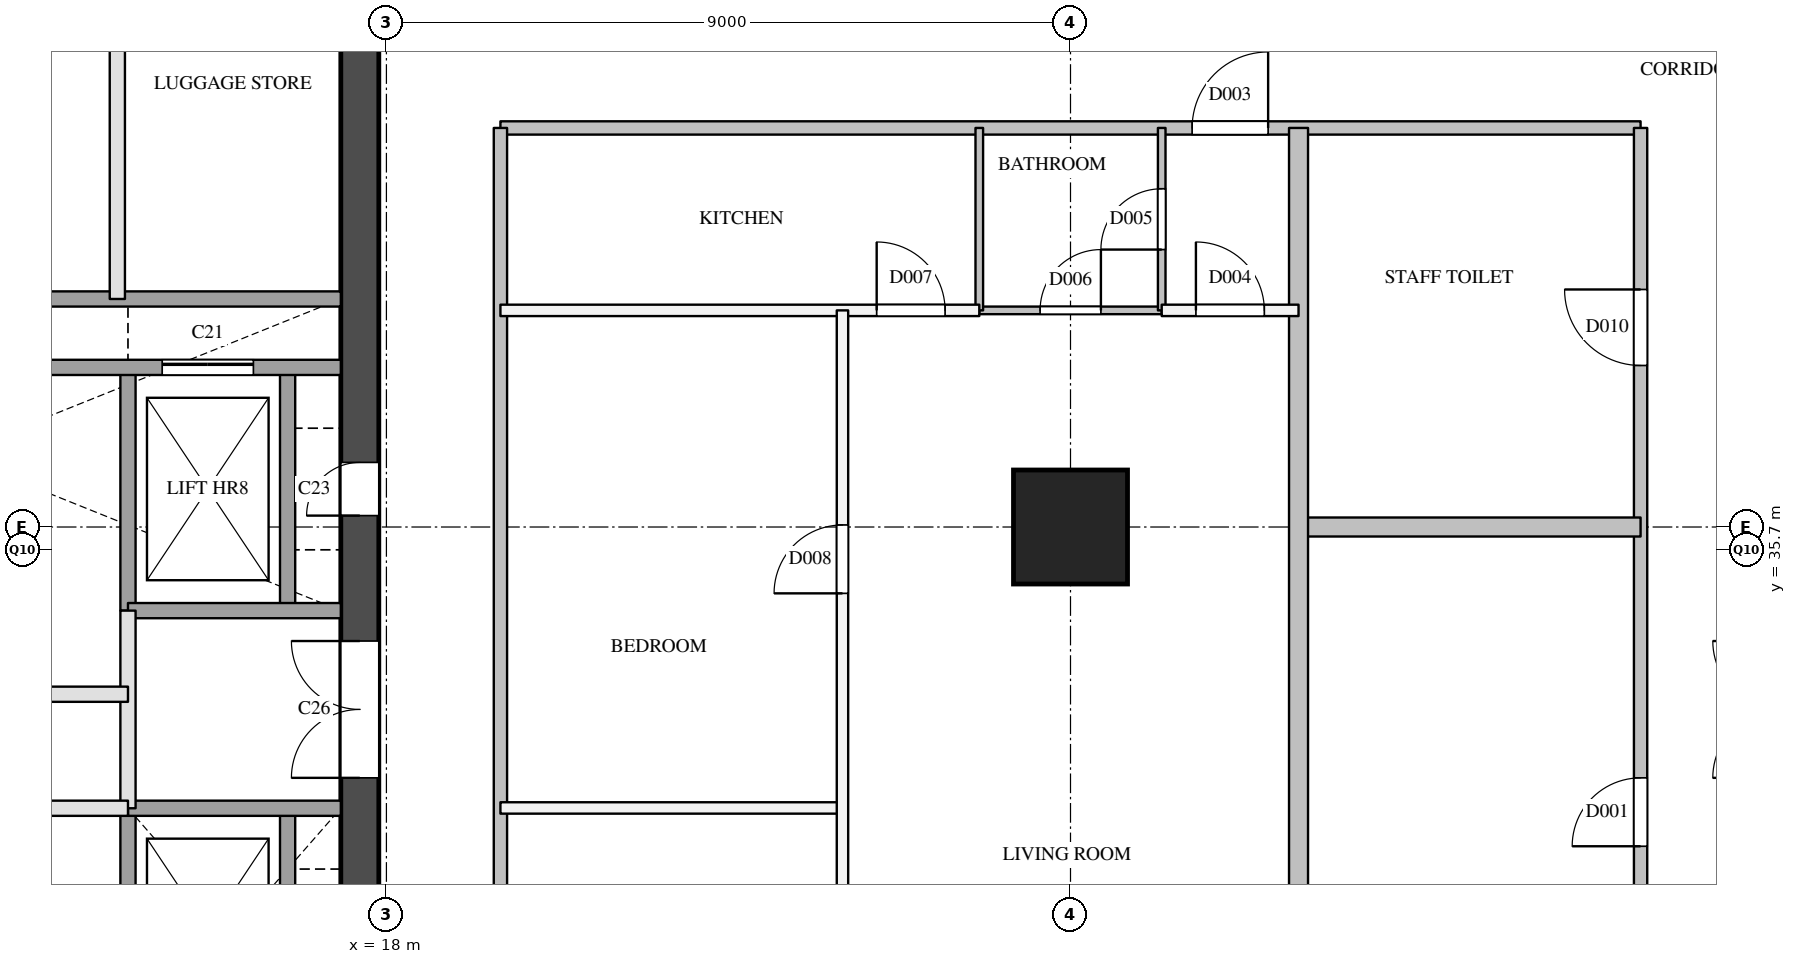
"""IFC4 building model, lengths in metres.
Left out: names, types, materials, properties, quantities, classifications, styles, units other than length and angle.
Written with IfcOpenShell. Run it as: python <this file> out.ifc"""

import sys

from ifc_helpers import new_model, si_unit, direction, frame, frame_2d, origin, origin_2d, place, context, subcontext, project, spatial, rectangle, extrude, element, fill, save


model = new_model("IFC4")
c1 = context("Model", 3, precision=1e-05, world=origin(), true_north=direction((0.0, 1.0)))
c2 = subcontext(c1, "Body", "Model", "MODEL_VIEW")
j1 = project(units=[si_unit("LENGTHUNIT", "METRE"), si_unit("PLANEANGLEUNIT", "RADIAN")], contexts=[c1])
p1 = place(None, origin())
s1 = spatial("IfcSite", under=j1, at=p1, CompositionType="ELEMENT")
p2 = place(p1, origin())
s2 = spatial("IfcBuilding", under=s1, at=p2, CompositionType="ELEMENT")
p3 = place(p2, frame((0.0, 0.0, 150.5)))
s3 = spatial("IfcBuildingStorey", under=s2, at=p3, CompositionType="ELEMENT", Elevation=150.5)
p4 = place(p3, frame((27.0, 36.0, 0.0), z_axis=(0.0, 0.0, 1.0), x_axis=(1.0, 0.0, 0.0)))
e1 = element("IfcColumn", 1, at=p4, inside=s3, PredefinedType="COLUMN", context=c2, shape_type="SweptSolid", body=[
    extrude(rectangle(XDim=1.5, YDim=1.5, at=origin_2d()), origin(), (0.0, 0.0, 1.0), 3.9),
])
p5 = place(p3, frame((17.65, 29.1, 0.0), z_axis=(0.0, 0.0, 1.0), x_axis=(0.0, 1.0, 0.0)))
e2 = element("IfcWall", 2, at=p5, inside=s3, PredefinedType="SHEAR", context=c2, shape_type="SweptSolid", body=[
    extrude(rectangle(XDim=20.3, YDim=0.5, at=frame_2d((10.15, 0.0))), origin(), (0.0, 0.0, 1.0), 3.6),
])
p6 = place(p5, frame((1.25, 0.0, 0.0)))
e3 = element("IfcOpeningElement", 3, at=p6, cuts=e2, PredefinedType="OPENING", context=c2, shape_type="SweptSolid", body=[
    extrude(rectangle(XDim=0.7, YDim=2.1, at=frame_2d((0.35, 1.05))), frame((0.0, 0.26, 0.0), z_axis=(0.0, -1.0, 0.0), x_axis=(1.0, 0.0, 0.0)), (0.0, 0.0, 1.0), 0.52),
])
p7 = place(p5, frame((7.05, 0.0, 0.0)))
e4 = element("IfcOpeningElement", 4, at=p7, cuts=e2, PredefinedType="OPENING", context=c2, shape_type="SweptSolid", body=[
    extrude(rectangle(XDim=0.7, YDim=2.1, at=frame_2d((0.35, 1.05))), frame((0.0, 0.26, 0.0), z_axis=(0.0, -1.0, 0.0), x_axis=(1.0, 0.0, 0.0)), (0.0, 0.0, 1.0), 0.52),
])
p8 = place(p5, frame((3.6, 0.0, 0.0)))
e5 = element("IfcOpeningElement", 5, at=p8, cuts=e2, PredefinedType="OPENING", context=c2, shape_type="SweptSolid", body=[
    extrude(rectangle(XDim=1.8, YDim=2.1, at=frame_2d((0.9, 1.05))), frame((0.0, 0.26, 0.0), z_axis=(0.0, -1.0, 0.0), x_axis=(1.0, 0.0, 0.0)), (0.0, 0.0, 1.0), 0.52),
])
p9 = place(p3, frame((14.46, 39.0, 0.0), z_axis=(0.0, 0.0, 1.0), x_axis=(0.0, 1.0, 0.0)))
e6 = element("IfcWall", 6, at=p9, inside=s3, PredefinedType="PARTITIONING", context=c2, shape_type="SweptSolid", body=[
    extrude(rectangle(XDim=6.2, YDim=0.2, at=frame_2d((3.1, 0.0))), origin(), (0.0, 0.0, 1.0), 3.6),
])
p10 = place(p3, frame((14.6, 32.3, 0.0), z_axis=(0.0, 0.0, 1.0), x_axis=(0.0, 1.0, 0.0)))
e7 = element("IfcWall", 7, at=p10, inside=s3, PredefinedType="PARTITIONING", context=c2, shape_type="SweptSolid", body=[
    extrude(rectangle(XDim=2.6, YDim=0.2, at=frame_2d((1.3, 0.0))), origin(), (0.0, 0.0, 1.0), 3.6),
])
p11 = place(p3, frame((14.6, 29.1, 0.0), z_axis=(0.0, 0.0, 1.0), x_axis=(0.0, 1.0, 0.0)))
e8 = element("IfcWall", 8, at=p11, inside=s3, PredefinedType="SOLIDWALL", context=c2, shape_type="SweptSolid", body=[
    extrude(rectangle(XDim=3.2, YDim=0.2, at=frame_2d((1.6, 0.0))), origin(), (0.0, 0.0, 1.0), 3.6),
])
p12 = place(p3, frame((14.6, 34.9, 0.0), z_axis=(0.0, 0.0, 1.0), x_axis=(0.0, 1.0, 0.0)))
e9 = element("IfcWall", 9, at=p12, inside=s3, PredefinedType="SOLIDWALL", context=c2, shape_type="SweptSolid", body=[
    extrude(rectangle(XDim=3.2, YDim=0.2, at=frame_2d((1.6, 0.0))), origin(), (0.0, 0.0, 1.0), 3.6),
])
p13 = place(p3, frame((16.7, 29.1, 0.0), z_axis=(0.0, 0.0, 1.0), x_axis=(0.0, 1.0, 0.0)))
e10 = element("IfcWall", 10, at=p13, inside=s3, PredefinedType="SOLIDWALL", context=c2, shape_type="SweptSolid", body=[
    extrude(rectangle(XDim=3.2, YDim=0.2, at=frame_2d((1.6, 0.0))), origin(), (0.0, 0.0, 1.0), 3.6),
])
p14 = place(p3, frame((16.7, 34.9, 0.0), z_axis=(0.0, 0.0, 1.0), x_axis=(0.0, 1.0, 0.0)))
e11 = element("IfcWall", 11, at=p14, inside=s3, PredefinedType="SOLIDWALL", context=c2, shape_type="SweptSolid", body=[
    extrude(rectangle(XDim=3.2, YDim=0.2, at=frame_2d((1.6, 0.0))), origin(), (0.0, 0.0, 1.0), 3.6),
])
p15 = place(p3, frame((6.2, 32.3, 0.0), z_axis=(0.0, 0.0, 1.0), x_axis=(1.0, 0.0, 0.0)))
e12 = element("IfcWall", 12, at=p15, inside=s3, PredefinedType="PARTITIONING", context=c2, shape_type="SweptSolid", body=[
    extrude(rectangle(XDim=8.4, YDim=0.2, at=frame_2d((4.2, 0.0))), origin(), (0.0, 0.0, 1.0), 3.6),
])
p16 = place(p15, frame((2.07, 0.0, 0.0)))
e13 = element("IfcOpeningElement", 13, at=p16, cuts=e12, PredefinedType="OPENING", context=c2, shape_type="SweptSolid", body=[
    extrude(rectangle(XDim=0.9, YDim=2.1, at=frame_2d((0.45, 1.05))), frame((0.0, 0.11, 0.0), z_axis=(0.0, -1.0, 0.0), x_axis=(1.0, 0.0, 0.0)), (0.0, 0.0, 1.0), 0.22),
])
p17 = place(p15, frame((6.27, 0.0, 0.0)))
e14 = element("IfcOpeningElement", 14, at=p17, cuts=e12, PredefinedType="OPENING", context=c2, shape_type="SweptSolid", body=[
    extrude(rectangle(XDim=0.9, YDim=2.1, at=frame_2d((0.45, 1.05))), frame((0.0, 0.11, 0.0), z_axis=(0.0, -1.0, 0.0), x_axis=(1.0, 0.0, 0.0)), (0.0, 0.0, 1.0), 0.22),
])
p18 = place(p3, frame((14.6, 32.3, 0.0), z_axis=(0.0, 0.0, 1.0), x_axis=(1.0, 0.0, 0.0)))
e15 = element("IfcWall", 15, at=p18, inside=s3, PredefinedType="SOLIDWALL", context=c2, shape_type="SweptSolid", body=[
    extrude(rectangle(XDim=2.8, YDim=0.2, at=frame_2d((1.4, 0.0))), origin(), (0.0, 0.0, 1.0), 3.6),
])
p19 = place(p3, frame((6.2, 33.8, 0.0), z_axis=(0.0, 0.0, 1.0), x_axis=(1.0, 0.0, 0.0)))
e16 = element("IfcWall", 16, at=p19, inside=s3, PredefinedType="PARTITIONING", context=c2, shape_type="SweptSolid", body=[
    extrude(rectangle(XDim=8.4, YDim=0.2, at=frame_2d((4.2, 0.0))), origin(), (0.0, 0.0, 1.0), 3.6),
])
p20 = place(p19, frame((0.81, 0.0, 0.0)))
e17 = element("IfcOpeningElement", 17, at=p20, cuts=e16, PredefinedType="OPENING", context=c2, shape_type="SweptSolid", body=[
    extrude(rectangle(XDim=0.9, YDim=2.1, at=frame_2d((0.45, 1.05))), frame((0.0, 0.11, 0.0), z_axis=(0.0, -1.0, 0.0), x_axis=(1.0, 0.0, 0.0)), (0.0, 0.0, 1.0), 0.22),
])
p21 = place(p19, frame((5.01, 0.0, 0.0)))
e18 = element("IfcOpeningElement", 18, at=p21, cuts=e16, PredefinedType="OPENING", context=c2, shape_type="SweptSolid", body=[
    extrude(rectangle(XDim=0.9, YDim=2.1, at=frame_2d((0.45, 1.05))), frame((0.0, 0.11, 0.0), z_axis=(0.0, -1.0, 0.0), x_axis=(1.0, 0.0, 0.0)), (0.0, 0.0, 1.0), 0.22),
])
p22 = place(p3, frame((14.6, 34.9, 0.0), z_axis=(0.0, 0.0, 1.0), x_axis=(1.0, 0.0, 0.0)))
e19 = element("IfcWall", 19, at=p22, inside=s3, PredefinedType="SOLIDWALL", context=c2, shape_type="SweptSolid", body=[
    extrude(rectangle(XDim=2.8, YDim=0.2, at=frame_2d((1.4, 0.0))), origin(), (0.0, 0.0, 1.0), 3.6),
])
p23 = place(p3, frame((6.2, 38.1, 0.0), z_axis=(0.0, 0.0, 1.0), x_axis=(1.0, 0.0, 0.0)))
e20 = element("IfcWall", 20, at=p23, inside=s3, PredefinedType="SOLIDWALL", context=c2, shape_type="SweptSolid", body=[
    extrude(rectangle(XDim=11.2, YDim=0.2, at=frame_2d((5.6, 0.0))), origin(), (0.0, 0.0, 1.0), 3.6),
])
p24 = place(p23, frame((8.85, 0.0, 0.0)))
e21 = element("IfcOpeningElement", 21, at=p24, cuts=e20, PredefinedType="OPENING", context=c2, shape_type="SweptSolid", body=[
    extrude(rectangle(XDim=1.2, YDim=2.1, at=frame_2d((0.6, 1.05))), frame((0.0, 0.11, 0.0), z_axis=(0.0, -1.0, 0.0), x_axis=(1.0, 0.0, 0.0)), (0.0, 0.0, 1.0), 0.22),
])
p25 = place(p3, frame((12.5, 39.0, 0.0), z_axis=(0.0, 0.0, 1.0), x_axis=(1.0, 0.0, 0.0)))
e22 = element("IfcWall", 22, at=p25, inside=s3, PredefinedType="SOLIDWALL", context=c2, shape_type="SweptSolid", body=[
    extrude(rectangle(XDim=4.9, YDim=0.2, at=frame_2d((2.45, 0.0))), origin(), (0.0, 0.0, 1.0), 3.6),
])
p26 = place(p3, frame((19.5, 41.25, 0.0), z_axis=(0.0, 0.0, 1.0), x_axis=(1.0, 0.0, 0.0)))
e23 = element("IfcWall", 23, at=p26, inside=s3, PredefinedType="PARTITIONING", context=c2, shape_type="SweptSolid", body=[
    extrude(rectangle(XDim=15.0, YDim=0.175, at=frame_2d((7.5, 0.0))), origin(), (0.0, 0.0, 1.0), 2.6),
])
p27 = place(p26, frame((9.1, 0.0, 0.0)))
e24 = element("IfcOpeningElement", 24, at=p27, cuts=e23, PredefinedType="OPENING", context=c2, shape_type="SweptSolid", body=[
    extrude(rectangle(XDim=1.0, YDim=2.1, at=frame_2d((0.5, 1.05))), frame((0.0, 0.097, 0.0), z_axis=(0.0, -1.0, 0.0), x_axis=(1.0, 0.0, 0.0)), (0.0, 0.0, 1.0), 0.195),
])
p28 = place(p3, frame((19.5, 28.5, 0.0), z_axis=(0.0, 0.0, 1.0), x_axis=(0.0, 1.0, 0.0)))
e25 = element("IfcWall", 25, at=p28, inside=s3, PredefinedType="PARTITIONING", context=c2, shape_type="SweptSolid", body=[
    extrude(rectangle(XDim=12.75, YDim=0.175, at=frame_2d((6.375, 0.0))), origin(), (0.0, 0.0, 1.0), 3.6),
])
p29 = place(p3, frame((34.5, 28.5, 0.0), z_axis=(0.0, 0.0, 1.0), x_axis=(0.0, 1.0, 0.0)))
e26 = element("IfcWall", 26, at=p29, inside=s3, PredefinedType="PARTITIONING", context=c2, shape_type="SweptSolid", body=[
    extrude(rectangle(XDim=12.75, YDim=0.175, at=frame_2d((6.375, 0.0))), origin(), (0.0, 0.0, 1.0), 3.6),
])
p30 = place(p29, frame((3.3, 0.0, 0.0)))
e27 = element("IfcOpeningElement", 27, at=p30, cuts=e26, PredefinedType="OPENING", context=c2, shape_type="SweptSolid", body=[
    extrude(rectangle(XDim=0.9, YDim=2.1, at=frame_2d((0.45, 1.05))), frame((0.0, 0.097, 0.0), z_axis=(0.0, -1.0, 0.0), x_axis=(1.0, 0.0, 0.0)), (0.0, 0.0, 1.0), 0.195),
])
p31 = place(p29, frame((9.625, 0.0, 0.0)))
e28 = element("IfcOpeningElement", 28, at=p31, cuts=e26, PredefinedType="OPENING", context=c2, shape_type="SweptSolid", body=[
    extrude(rectangle(XDim=1.0, YDim=2.1, at=frame_2d((0.5, 1.05))), frame((0.0, 0.097, 0.0), z_axis=(0.0, -1.0, 0.0), x_axis=(1.0, 0.0, 0.0)), (0.0, 0.0, 1.0), 0.195),
])
p32 = place(p3, frame((19.5, 32.304, 0.0), z_axis=(0.0, 0.0, 1.0), x_axis=(1.0, 0.0, 0.0)))
e29 = element("IfcWall", 29, at=p32, inside=s3, PredefinedType="PARTITIONING", context=c2, shape_type="SweptSolid", body=[
    extrude(rectangle(XDim=4.5, YDim=0.15, at=frame_2d((2.25, 0.0))), origin(), (0.0, 0.0, 1.0), 3.6),
])
p33 = place(p3, frame((19.5, 38.85, 0.0), z_axis=(0.0, 0.0, 1.0), x_axis=(1.0, 0.0, 0.0)))
e30 = element("IfcWall", 30, at=p33, inside=s3, PredefinedType="PARTITIONING", context=c2, shape_type="SweptSolid", body=[
    extrude(rectangle(XDim=6.3, YDim=0.15, at=frame_2d((3.15, 0.0))), origin(), (0.0, 0.0, 1.0), 3.6),
])
p34 = place(p33, frame((4.95, 0.0, 0.0)))
e31 = element("IfcOpeningElement", 31, at=p34, cuts=e30, PredefinedType="OPENING", context=c2, shape_type="SweptSolid", body=[
    extrude(rectangle(XDim=0.9, YDim=2.1, at=frame_2d((0.45, 1.05))), frame((0.0, 0.085, 0.0), z_axis=(0.0, -1.0, 0.0), x_axis=(1.0, 0.0, 0.0)), (0.0, 0.0, 1.0), 0.17),
])
p35 = place(p3, frame((28.2, 38.85, 0.0), z_axis=(0.0, 0.0, 1.0), x_axis=(1.0, 0.0, 0.0)))
e32 = element("IfcWall", 32, at=p35, inside=s3, PredefinedType="PARTITIONING", context=c2, shape_type="SweptSolid", body=[
    extrude(rectangle(XDim=1.8, YDim=0.15, at=frame_2d((0.9, 0.0))), origin(), (0.0, 0.0, 1.0), 3.6),
])
p36 = place(p35, frame((0.45, 0.0, 0.0)))
e33 = element("IfcOpeningElement", 33, at=p36, cuts=e32, PredefinedType="OPENING", context=c2, shape_type="SweptSolid", body=[
    extrude(rectangle(XDim=0.9, YDim=2.1, at=frame_2d((0.45, 1.05))), frame((0.0, 0.085, 0.0), z_axis=(0.0, -1.0, 0.0), x_axis=(1.0, 0.0, 0.0)), (0.0, 0.0, 1.0), 0.17),
])
p37 = place(p3, frame((24.0, 27.0, 0.0), z_axis=(0.0, 0.0, 1.0), x_axis=(0.0, 1.0, 0.0)))
e34 = element("IfcWall", 34, at=p37, inside=s3, PredefinedType="PARTITIONING", context=c2, shape_type="SweptSolid", body=[
    extrude(rectangle(XDim=11.85, YDim=0.15, at=frame_2d((5.925, 0.0))), origin(), (0.0, 0.0, 1.0), 2.6),
])
p38 = place(p37, frame((8.127, 0.0, 0.0)))
e35 = element("IfcOpeningElement", 35, at=p38, cuts=e34, PredefinedType="OPENING", context=c2, shape_type="SweptSolid", body=[
    extrude(rectangle(XDim=0.9, YDim=2.1, at=frame_2d((0.45, 1.05))), frame((0.0, 0.085, 0.0), z_axis=(0.0, -1.0, 0.0), x_axis=(1.0, 0.0, 0.0)), (0.0, 0.0, 1.0), 0.17),
])
p39 = place(p37, frame((2.202, 0.0, 0.0)))
e36 = element("IfcOpeningElement", 36, at=p39, cuts=e34, PredefinedType="OPENING", context=c2, shape_type="SweptSolid", body=[
    extrude(rectangle(XDim=0.9, YDim=2.1, at=frame_2d((0.45, 1.05))), frame((0.0, 0.085, 0.0), z_axis=(0.0, -1.0, 0.0), x_axis=(1.0, 0.0, 0.0)), (0.0, 0.0, 1.0), 0.17),
])
p40 = place(p3, frame((30.0, 36.0, 0.0), z_axis=(0.0, 0.0, 1.0), x_axis=(1.0, 0.0, 0.0)))
e37 = element("IfcWall", 37, at=p40, inside=s3, PredefinedType="PARTITIONING", context=c2, shape_type="SweptSolid", body=[
    extrude(rectangle(XDim=4.5, YDim=0.25, at=frame_2d((2.25, 0.0))), origin(), (0.0, 0.0, 1.0), 3.6),
])
p41 = place(p3, frame((30.0, 27.0, 0.0), z_axis=(0.0, 0.0, 1.0), x_axis=(0.0, 1.0, 0.0)))
e38 = element("IfcWall", 38, at=p41, inside=s3, PredefinedType="PARTITIONING", context=c2, shape_type="SweptSolid", body=[
    extrude(rectangle(XDim=14.25, YDim=0.25, at=frame_2d((7.125, 0.0))), origin(), (0.0, 0.0, 1.0), 2.6),
])
p42 = place(p3, frame((25.8, 38.85, 0.0), z_axis=(0.0, 0.0, 1.0), x_axis=(1.0, 0.0, 0.0)))
e39 = element("IfcWall", 39, at=p42, inside=s3, PredefinedType="PARTITIONING", context=c2, shape_type="SweptSolid", body=[
    extrude(rectangle(XDim=2.4, YDim=0.1, at=frame_2d((1.2, 0.0))), origin(), (0.0, 0.0, 1.0), 2.6),
])
p43 = place(p42, frame((0.8, 0.0, 0.0)))
e40 = element("IfcOpeningElement", 40, at=p43, cuts=e39, PredefinedType="OPENING", context=c2, shape_type="SweptSolid", body=[
    extrude(rectangle(XDim=0.8, YDim=2.1, at=frame_2d((0.4, 1.05))), frame((0.0, 0.06, 0.0), z_axis=(0.0, -1.0, 0.0), x_axis=(1.0, 0.0, 0.0)), (0.0, 0.0, 1.0), 0.12),
])
p44 = place(p3, frame((25.8, 38.85, 0.0), z_axis=(0.0, 0.0, 1.0), x_axis=(0.0, 1.0, 0.0)))
e41 = element("IfcWall", 41, at=p44, inside=s3, PredefinedType="PARTITIONING", context=c2, shape_type="SweptSolid", body=[
    extrude(rectangle(XDim=2.4, YDim=0.1, at=frame_2d((1.2, 0.0))), origin(), (0.0, 0.0, 1.0), 3.6),
])
p45 = place(p3, frame((28.2, 38.85, 0.0), z_axis=(0.0, 0.0, 1.0), x_axis=(0.0, 1.0, 0.0)))
e42 = element("IfcWall", 42, at=p45, inside=s3, PredefinedType="PARTITIONING", context=c2, shape_type="SweptSolid", body=[
    extrude(rectangle(XDim=2.4, YDim=0.1, at=frame_2d((1.2, 0.0))), origin(), (0.0, 0.0, 1.0), 3.6),
])
p46 = place(p45, frame((0.8, 0.0, 0.0)))
e43 = element("IfcOpeningElement", 43, at=p46, cuts=e42, PredefinedType="OPENING", context=c2, shape_type="SweptSolid", body=[
    extrude(rectangle(XDim=0.8, YDim=2.1, at=frame_2d((0.4, 1.05))), frame((0.0, 0.06, 0.0), z_axis=(0.0, -1.0, 0.0), x_axis=(1.0, 0.0, 0.0)), (0.0, 0.0, 1.0), 0.12),
])
p47 = place(p24, origin())
e44 = element("IfcDoor", 44, at=p47, inside=s3, OperationType="SLIDING_TO_LEFT", PredefinedType="DOOR", context=c2, shape_type="SweptSolid", body=[
    extrude(rectangle(XDim=1.2, YDim=2.1, at=frame_2d((0.6, 1.05))), frame((0.0, 0.025, 0.0), z_axis=(0.0, -1.0, 0.0), x_axis=(1.0, 0.0, 0.0)), (0.0, 0.0, 1.0), 0.05),
])
fill(e21, e44)
p48 = place(p7, origin())
e45 = element("IfcDoor", 45, at=p48, inside=s3, OperationType="SINGLE_SWING_LEFT", PredefinedType="DOOR", context=c2, shape_type="SweptSolid", body=[
    extrude(rectangle(XDim=0.7, YDim=2.1, at=frame_2d((0.35, 1.05))), frame((0.0, 0.025, 0.0), z_axis=(0.0, -1.0, 0.0), x_axis=(1.0, 0.0, 0.0)), (0.0, 0.0, 1.0), 0.05),
])
fill(e4, e45)
p49 = place(p8, origin())
e46 = element("IfcDoor", 46, at=p49, inside=s3, OperationType="DOUBLE_DOOR_SINGLE_SWING", PredefinedType="DOOR", context=c2, shape_type="SweptSolid", body=[
    extrude(rectangle(XDim=1.8, YDim=2.1, at=frame_2d((0.9, 1.05))), frame((0.0, 0.025, 0.0), z_axis=(0.0, -1.0, 0.0), x_axis=(1.0, 0.0, 0.0)), (0.0, 0.0, 1.0), 0.05),
])
fill(e5, e46)
p50 = place(p30, origin())
e47 = element("IfcDoor", 47, at=p50, inside=s3, OperationType="SINGLE_SWING_LEFT", PredefinedType="DOOR", context=c2, shape_type="SweptSolid", body=[
    extrude(rectangle(XDim=0.9, YDim=2.1, at=frame_2d((0.45, 1.05))), frame((0.0, 0.025, 0.0), z_axis=(0.0, -1.0, 0.0), x_axis=(1.0, 0.0, 0.0)), (0.0, 0.0, 1.0), 0.05),
])
fill(e27, e47)
p51 = place(p27, origin())
e48 = element("IfcDoor", 48, at=p51, inside=s3, OperationType="SINGLE_SWING_RIGHT", PredefinedType="DOOR", context=c2, shape_type="SweptSolid", body=[
    extrude(rectangle(XDim=1.0, YDim=2.1, at=frame_2d((0.5, 1.05))), frame((0.0, 0.025, 0.0), z_axis=(0.0, -1.0, 0.0), x_axis=(1.0, 0.0, 0.0)), (0.0, 0.0, 1.0), 0.05),
])
fill(e24, e48)
p52 = place(p36, origin())
e49 = element("IfcDoor", 49, at=p52, inside=s3, OperationType="SINGLE_SWING_LEFT", PredefinedType="DOOR", context=c2, shape_type="SweptSolid", body=[
    extrude(rectangle(XDim=0.9, YDim=2.1, at=frame_2d((0.45, 1.05))), frame((0.0, 0.025, 0.0), z_axis=(0.0, -1.0, 0.0), x_axis=(1.0, 0.0, 0.0)), (0.0, 0.0, 1.0), 0.05),
])
fill(e33, e49)
p53 = place(p46, origin())
e50 = element("IfcDoor", 50, at=p53, inside=s3, OperationType="SINGLE_SWING_LEFT", PredefinedType="DOOR", context=c2, shape_type="SweptSolid", body=[
    extrude(rectangle(XDim=0.8, YDim=2.1, at=frame_2d((0.4, 1.05))), frame((0.0, 0.025, 0.0), z_axis=(0.0, -1.0, 0.0), x_axis=(1.0, 0.0, 0.0)), (0.0, 0.0, 1.0), 0.05),
])
fill(e43, e50)
p54 = place(p43, origin())
e51 = element("IfcDoor", 51, at=p54, inside=s3, OperationType="SINGLE_SWING_RIGHT", PredefinedType="DOOR", context=c2, shape_type="SweptSolid", body=[
    extrude(rectangle(XDim=0.8, YDim=2.1, at=frame_2d((0.4, 1.05))), frame((0.0, 0.025, 0.0), z_axis=(0.0, -1.0, 0.0), x_axis=(1.0, 0.0, 0.0)), (0.0, 0.0, 1.0), 0.05),
])
fill(e40, e51)
p55 = place(p34, origin())
e52 = element("IfcDoor", 52, at=p55, inside=s3, OperationType="SINGLE_SWING_LEFT", PredefinedType="DOOR", context=c2, shape_type="SweptSolid", body=[
    extrude(rectangle(XDim=0.9, YDim=2.1, at=frame_2d((0.45, 1.05))), frame((0.0, 0.025, 0.0), z_axis=(0.0, -1.0, 0.0), x_axis=(1.0, 0.0, 0.0)), (0.0, 0.0, 1.0), 0.05),
])
fill(e31, e52)
p56 = place(p38, origin())
e53 = element("IfcDoor", 53, at=p56, inside=s3, OperationType="SINGLE_SWING_LEFT", PredefinedType="DOOR", context=c2, shape_type="SweptSolid", body=[
    extrude(rectangle(XDim=0.9, YDim=2.1, at=frame_2d((0.45, 1.05))), frame((0.0, 0.025, 0.0), z_axis=(0.0, -1.0, 0.0), x_axis=(1.0, 0.0, 0.0)), (0.0, 0.0, 1.0), 0.05),
])
fill(e35, e53)
p57 = place(p31, origin())
e54 = element("IfcDoor", 54, at=p57, inside=s3, OperationType="SINGLE_SWING_RIGHT", PredefinedType="DOOR", context=c2, shape_type="SweptSolid", body=[
    extrude(rectangle(XDim=1.0, YDim=2.1, at=frame_2d((0.5, 1.05))), frame((0.0, 0.025, 0.0), z_axis=(0.0, -1.0, 0.0), x_axis=(1.0, 0.0, 0.0)), (0.0, 0.0, 1.0), 0.05),
])
fill(e28, e54)
save(model, sys.argv[1])
